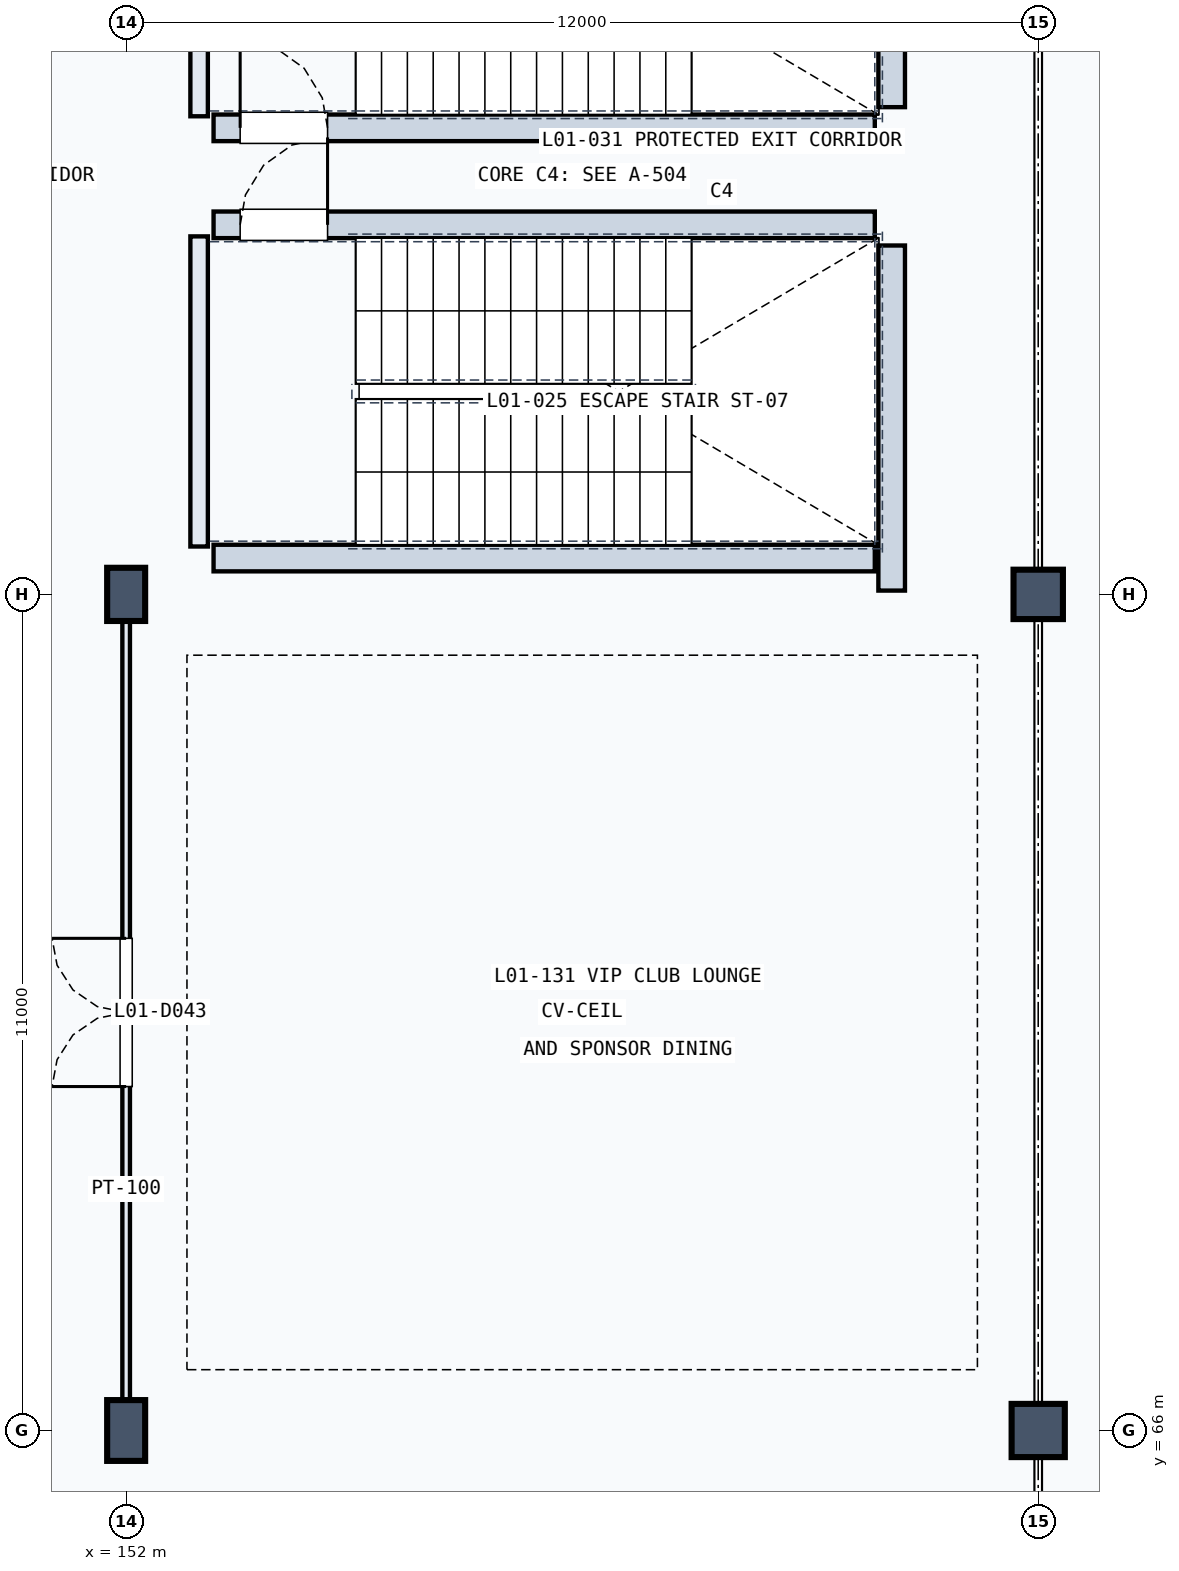
"""IFC4 building model, lengths in metres.
Left out: names, types, materials, properties, quantities, classifications, styles, units other than length and angle.
Written with IfcOpenShell. Run it as: python <this file> out.ifc"""

import sys

from ifc_helpers import new_model, si_unit, direction, frame, frame_2d, origin, origin_2d, place, context, subcontext, project, spatial, rectangle, extrude, element, fill, save


model = new_model("IFC4")
c1 = context("Model", 3, precision=1e-05, world=origin(), true_north=direction((0.0, 1.0)))
c2 = subcontext(c1, "Body", "Model", "MODEL_VIEW")
j1 = project(units=[si_unit("LENGTHUNIT", "METRE"), si_unit("PLANEANGLEUNIT", "RADIAN")], contexts=[c1])
p1 = place(None, origin())
s1 = spatial("IfcSite", under=j1, at=p1, CompositionType="ELEMENT")
p2 = place(p1, origin())
s2 = spatial("IfcBuilding", under=s1, at=p2, CompositionType="ELEMENT")
p3 = place(p2, frame((0.0, 0.0, 5.4)))
s3 = spatial("IfcBuildingStorey", under=s2, at=p3, CompositionType="ELEMENT", Elevation=5.4)
p4 = place(p3, frame((152.0, 66.0, 0.0), z_axis=(0.0, 0.0, 1.0), x_axis=(1.0, 0.0, 0.0)))
e1 = element("IfcColumn", 1, at=p4, inside=s3, PredefinedType="COLUMN", context=c2, shape_type="SweptSolid", body=[
    extrude(rectangle(XDim=0.5, YDim=0.8, at=origin_2d()), origin(), (0.0, 0.0, 1.0), 4.8),
])
p5 = place(p3, frame((152.0, 77.0, 0.0), z_axis=(0.0, 0.0, 1.0), x_axis=(1.0, 0.0, 0.0)))
e2 = element("IfcColumn", 2, at=p5, inside=s3, PredefinedType="COLUMN", context=c2, shape_type="SweptSolid", body=[
    extrude(rectangle(XDim=0.5, YDim=0.7, at=origin_2d()), origin(), (0.0, 0.0, 1.0), 4.8),
])
p6 = place(p3, frame((164.0, 66.0, 0.0), z_axis=(0.0, 0.0, 1.0), x_axis=(1.0, 0.0, 0.0)))
e3 = element("IfcColumn", 3, at=p6, inside=s3, PredefinedType="COLUMN", context=c2, shape_type="SweptSolid", body=[
    extrude(rectangle(XDim=0.7, YDim=0.7, at=origin_2d()), origin(), (0.0, 0.0, 1.0), 4.8),
])
p7 = place(p3, frame((164.0, 77.0, 0.0), z_axis=(0.0, 0.0, 1.0), x_axis=(1.0, 0.0, 0.0)))
e4 = element("IfcColumn", 4, at=p7, inside=s3, PredefinedType="COLUMN", context=c2, shape_type="SweptSolid", body=[
    extrude(rectangle(XDim=0.65, YDim=0.65, at=origin_2d()), origin(), (0.0, 0.0, 1.0), 4.8),
])
p8 = place(p3, frame((152.96, 77.63, 0.0), z_axis=(0.0, 0.0, 1.0), x_axis=(0.0, 1.0, 0.0)))
e5 = element("IfcWall", 5, at=p8, inside=s3, PredefinedType="SOLIDWALL", context=c2, shape_type="SweptSolid", body=[
    extrude(rectangle(XDim=4.08, YDim=0.23, at=frame_2d((2.04, 0.0))), origin(), (0.0, 0.0, 1.0), 4.46),
])
p9 = place(p3, frame((162.072, 77.05, 0.0), z_axis=(0.0, 0.0, 1.0), x_axis=(0.0, 1.0, 0.0)))
e6 = element("IfcWall", 6, at=p9, inside=s3, PredefinedType="SOLIDWALL", context=c2, shape_type="SweptSolid", body=[
    extrude(rectangle(XDim=4.54, YDim=0.35, at=frame_2d((2.27, 0.0))), origin(), (0.0, 0.0, 1.0), 4.46),
])
p10 = place(p3, frame((153.15, 77.478, 0.0), z_axis=(0.0, 0.0, 1.0), x_axis=(1.0, 0.0, 0.0)))
e7 = element("IfcWall", 7, at=p10, inside=s3, PredefinedType="SOLIDWALL", context=c2, shape_type="SweptSolid", body=[
    extrude(rectangle(XDim=8.7, YDim=0.35, at=frame_2d((4.35, 0.0))), origin(), (0.0, 0.0, 1.0), 4.46),
])
p11 = place(p3, frame((153.15, 81.862, 0.0), z_axis=(0.0, 0.0, 1.0), x_axis=(1.0, 0.0, 0.0)))
e8 = element("IfcWall", 8, at=p11, inside=s3, PredefinedType="SOLIDWALL", context=c2, shape_type="SweptSolid", body=[
    extrude(rectangle(XDim=8.7, YDim=0.35, at=frame_2d((4.35, 0.0))), origin(), (0.0, 0.0, 1.0), 4.46),
])
p12 = place(p11, frame((0.35, 0.0, 0.0)))
e9 = element("IfcOpeningElement", 9, at=p12, cuts=e8, PredefinedType="OPENING", context=c2, shape_type="SweptSolid", body=[
    extrude(rectangle(XDim=1.15, YDim=2.2, at=frame_2d((0.575, 1.1))), frame((0.0, 0.185, 0.0), z_axis=(0.0, -1.0, 0.0), x_axis=(1.0, 0.0, 0.0)), (0.0, 0.0, 1.0), 0.37),
])
p13 = place(p3, frame((152.96, 83.29, 0.0), z_axis=(0.0, 0.0, 1.0), x_axis=(0.0, 1.0, 0.0)))
e10 = element("IfcWall", 10, at=p13, inside=s3, PredefinedType="SOLIDWALL", context=c2, shape_type="SweptSolid", body=[
    extrude(rectangle(XDim=4.08, YDim=0.23, at=frame_2d((2.04, 0.0))), origin(), (0.0, 0.0, 1.0), 4.46),
])
p14 = place(p3, frame((162.072, 83.41, 0.0), z_axis=(0.0, 0.0, 1.0), x_axis=(0.0, 1.0, 0.0)))
e11 = element("IfcWall", 11, at=p14, inside=s3, PredefinedType="SOLIDWALL", context=c2, shape_type="SweptSolid", body=[
    extrude(rectangle(XDim=3.84, YDim=0.35, at=frame_2d((1.92, 0.0))), origin(), (0.0, 0.0, 1.0), 4.46),
])
p15 = place(p3, frame((153.15, 83.138, 0.0), z_axis=(0.0, 0.0, 1.0), x_axis=(1.0, 0.0, 0.0)))
e12 = element("IfcWall", 12, at=p15, inside=s3, PredefinedType="SOLIDWALL", context=c2, shape_type="SweptSolid", body=[
    extrude(rectangle(XDim=8.7, YDim=0.35, at=frame_2d((4.35, 0.0))), origin(), (0.0, 0.0, 1.0), 4.46),
])
p16 = place(p15, frame((0.35, 0.0, 0.0)))
e13 = element("IfcOpeningElement", 13, at=p16, cuts=e12, PredefinedType="OPENING", context=c2, shape_type="SweptSolid", body=[
    extrude(rectangle(XDim=1.15, YDim=2.2, at=frame_2d((0.575, 1.1))), frame((0.0, 0.185, 0.0), z_axis=(0.0, -1.0, 0.0), x_axis=(1.0, 0.0, 0.0)), (0.0, 0.0, 1.0), 0.37),
])
p17 = place(p3, frame((152.0, 66.22, 0.0), z_axis=(0.0, 0.0, 1.0), x_axis=(0.0, 1.0, 0.0)))
e14 = element("IfcWall", 14, at=p17, inside=s3, PredefinedType="PARTITIONING", context=c2, shape_type="SweptSolid", body=[
    extrude(rectangle(XDim=10.56, YDim=0.1, at=frame_2d((5.28, 0.0))), origin(), (0.0, 0.0, 1.0), 3.49),
])
p18 = place(p17, frame((4.305, 0.0, 0.0)))
e15 = element("IfcOpeningElement", 15, at=p18, cuts=e14, PredefinedType="OPENING", context=c2, shape_type="SweptSolid", body=[
    extrude(rectangle(XDim=1.95, YDim=2.4, at=frame_2d((0.975, 1.2))), frame((0.0, 0.06, 0.0), z_axis=(0.0, -1.0, 0.0), x_axis=(1.0, 0.0, 0.0)), (0.0, 0.0, 1.0), 0.12),
])
p19 = place(p12, origin())
e16 = element("IfcDoor", 16, at=p19, inside=s3, OperationType="SINGLE_SWING_RIGHT", PredefinedType="DOOR", context=c2, shape_type="SweptSolid", body=[
    extrude(rectangle(XDim=1.15, YDim=2.2, at=frame_2d((0.575, 1.1))), frame((0.0, 0.025, 0.0), z_axis=(0.0, -1.0, 0.0), x_axis=(1.0, 0.0, 0.0)), (0.0, 0.0, 1.0), 0.05),
])
fill(e9, e16)
p20 = place(p16, origin())
e17 = element("IfcDoor", 17, at=p20, inside=s3, OperationType="SINGLE_SWING_LEFT", PredefinedType="DOOR", context=c2, shape_type="SweptSolid", body=[
    extrude(rectangle(XDim=1.15, YDim=2.2, at=frame_2d((0.575, 1.1))), frame((0.0, 0.025, 0.0), z_axis=(0.0, -1.0, 0.0), x_axis=(1.0, 0.0, 0.0)), (0.0, 0.0, 1.0), 0.05),
])
fill(e13, e17)
p21 = place(p18, origin())
e18 = element("IfcDoor", 18, at=p21, inside=s3, OperationType="DOUBLE_DOOR_SINGLE_SWING", PredefinedType="DOOR", context=c2, shape_type="SweptSolid", body=[
    extrude(rectangle(XDim=1.95, YDim=2.4, at=frame_2d((0.975, 1.2))), frame((0.0, 0.025, 0.0), z_axis=(0.0, -1.0, 0.0), x_axis=(1.0, 0.0, 0.0)), (0.0, 0.0, 1.0), 0.05),
])
fill(e15, e18)
save(model, sys.argv[1])
